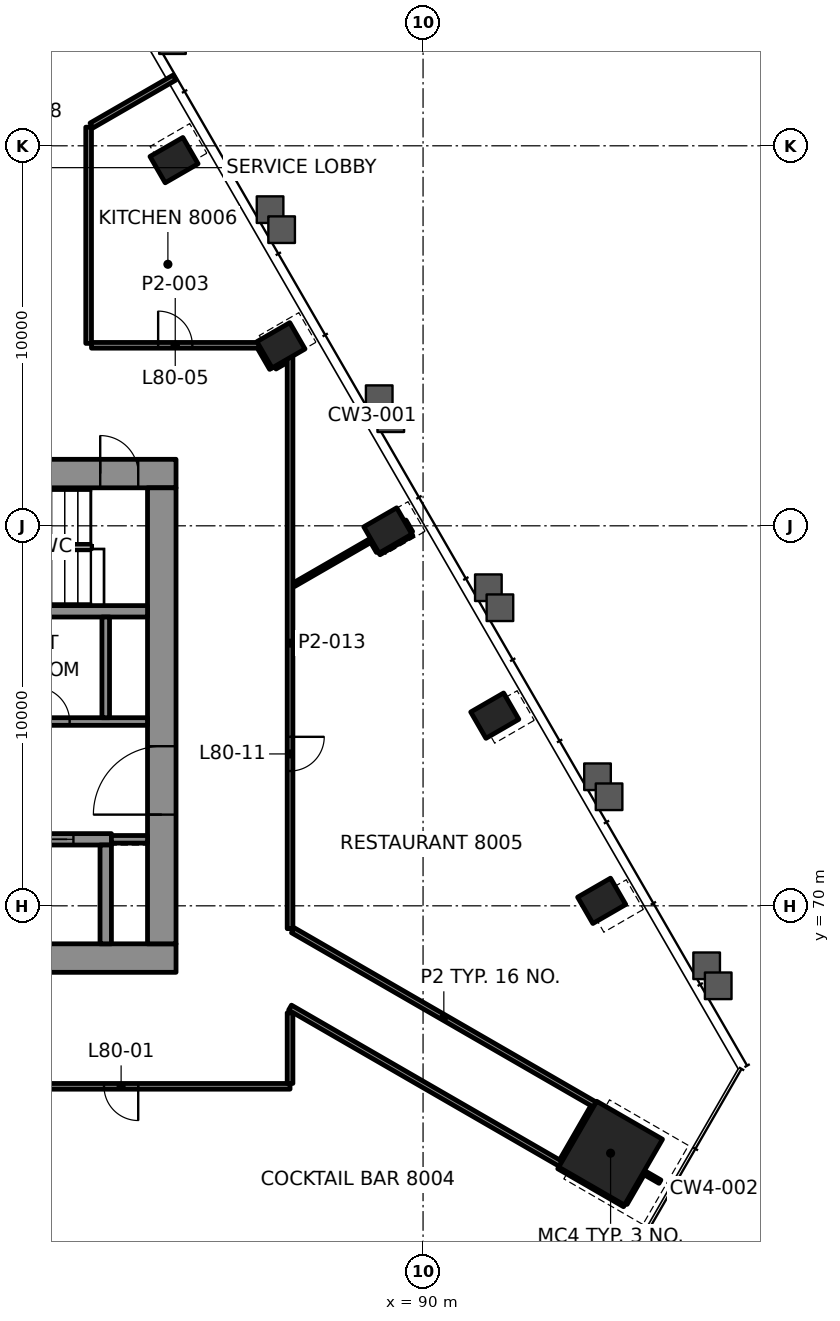
"""IFC4 building model, lengths in metres.
Left out: names, types, materials, properties, quantities, classifications, styles, units other than length and angle.
Written with IfcOpenShell. Run it as: python <this file> out.ifc"""

import sys

from ifc_helpers import new_model, si_unit, direction, frame, frame_2d, origin, origin_2d, place, context, subcontext, project, spatial, rectangle, hollow_rectangle, extrude, element, fill, save


model = new_model("IFC4")
c1 = context("Model", 3, precision=1e-05, world=origin(), true_north=direction((0.0, 1.0)))
c2 = subcontext(c1, "Body", "Model", "MODEL_VIEW")
j1 = project(units=[si_unit("LENGTHUNIT", "METRE"), si_unit("PLANEANGLEUNIT", "RADIAN")], contexts=[c1])
p1 = place(None, origin())
s1 = spatial("IfcSite", under=j1, at=p1, CompositionType="ELEMENT")
p2 = place(p1, origin())
s2 = spatial("IfcBuilding", under=s1, at=p2, CompositionType="ELEMENT")
p3 = place(p2, frame((0.0, 0.0, 326.6)))
s3 = spatial("IfcBuildingStorey", under=s2, at=p3, CompositionType="ELEMENT", Elevation=326.6)
p4 = place(p3, frame((94.935, 63.491, 0.0), z_axis=(0.0, 0.0, 1.0), x_axis=(0.5, 0.866025403784, 0.0)))
e1 = element("IfcColumn", 1, at=p4, inside=s3, PredefinedType="COLUMN", context=c2, shape_type="SweptSolid", body=[
    extrude(rectangle(XDim=2.0, YDim=2.0, at=origin_2d()), origin(), (0.0, 0.0, 1.0), 5.0),
])
for number, where, z_axis, x_axis in (
    (2, (94.701, 70.131, -0.0), (0.0, 0.0, 1.0), (-0.5, 0.866, 0.0)),
    (3, (91.887, 75.004, -0.0), (0.0, 0.0, 1.0), (-0.5, 0.866, 0.0)),
    (4, (89.074, 79.877, -0.0), (0.0, 0.0, 1.0), (-0.5, 0.866, 0.0)),
    (5, (86.26, 84.75, -0.0), (0.0, 0.0, 1.0), (-0.5, 0.866, 0.0)),
    (6, (83.447, 89.623, -0.0), (0.0, 0.0, 1.0), (-0.5, 0.866, 0.0)),
):
    element("IfcColumn", number, at=place(p3, frame(where, z_axis=z_axis, x_axis=x_axis)), inside=s3, PredefinedType="COLUMN", context=c2, shape_type="SweptSolid", body=[
        extrude(hollow_rectangle(XDim=0.8, YDim=1.0, WallThickness=0.05, at=origin_2d()), origin(), (0.0, 0.0, 1.0), 5.0),
    ])
p5 = place(p3, frame((66.5, 68.625, 0.0), z_axis=(0.0, 0.0, 1.0), x_axis=(1.0, 0.0, 0.0)))
e7 = element("IfcWall", 7, at=p5, inside=s3, PredefinedType="SHEAR", context=c2, shape_type="SweptSolid", body=[
    extrude(rectangle(XDim=17.0, YDim=0.75, at=frame_2d((8.5, 0.0))), origin(), (0.0, 0.0, 1.0), 4.7),
])
p6 = place(p5, frame((2.7, 0.0, 0.0)))
e8 = element("IfcOpeningElement", 8, at=p6, cuts=e7, PredefinedType="OPENING", context=c2, shape_type="SweptSolid", body=[
    extrude(rectangle(XDim=0.9, YDim=2.1, at=frame_2d((0.45, 1.05))), frame((0.0, 0.385, 0.0), z_axis=(0.0, -1.0, 0.0), x_axis=(1.0, 0.0, 0.0)), (0.0, 0.0, 1.0), 0.77),
])
p7 = place(p3, frame((66.5, 81.375, 0.0), z_axis=(0.0, 0.0, 1.0), x_axis=(1.0, 0.0, 0.0)))
e9 = element("IfcWall", 9, at=p7, inside=s3, PredefinedType="SHEAR", context=c2, shape_type="SweptSolid", body=[
    extrude(rectangle(XDim=17.0, YDim=0.75, at=frame_2d((8.5, 0.0))), origin(), (0.0, 0.0, 1.0), 4.7),
])
p8 = place(p7, frame((1.195, 0.0, 0.0)))
e10 = element("IfcOpeningElement", 10, at=p8, cuts=e9, PredefinedType="OPENING", context=c2, shape_type="SweptSolid", body=[
    extrude(rectangle(XDim=1.0, YDim=2.1, at=frame_2d((0.5, 1.05))), frame((0.0, 0.385, 0.0), z_axis=(0.0, -1.0, 0.0), x_axis=(1.0, 0.0, 0.0)), (0.0, 0.0, 1.0), 0.77),
])
p9 = place(p7, frame((15.005, 0.0, 0.0)))
e11 = element("IfcOpeningElement", 11, at=p9, cuts=e9, PredefinedType="OPENING", context=c2, shape_type="SweptSolid", body=[
    extrude(rectangle(XDim=1.0, YDim=2.1, at=frame_2d((0.5, 1.05))), frame((0.0, 0.385, 0.0), z_axis=(0.0, -1.0, 0.0), x_axis=(1.0, 0.0, 0.0)), (0.0, 0.0, 1.0), 0.77),
])
p10 = place(p7, frame((8.15, 0.0, 0.0)))
e12 = element("IfcOpeningElement", 12, at=p10, cuts=e9, PredefinedType="OPENING", context=c2, shape_type="SweptSolid", body=[
    extrude(rectangle(XDim=0.9, YDim=2.1, at=frame_2d((0.45, 1.05))), frame((0.0, 0.385, 0.0), z_axis=(0.0, -1.0, 0.0), x_axis=(1.0, 0.0, 0.0)), (0.0, 0.0, 1.0), 0.77),
])
p11 = place(p3, frame((83.125, 69.0, 0.0), z_axis=(0.0, 0.0, 1.0), x_axis=(0.0, 1.0, 0.0)))
e13 = element("IfcWall", 13, at=p11, inside=s3, PredefinedType="SHEAR", context=c2, shape_type="SweptSolid", body=[
    extrude(rectangle(XDim=12.0, YDim=0.75, at=frame_2d((6.0, 0.0))), origin(), (0.0, 0.0, 1.0), 4.7),
])
p12 = place(p11, frame((3.4, 0.0, 0.0)))
e14 = element("IfcOpeningElement", 14, at=p12, cuts=e13, PredefinedType="OPENING", context=c2, shape_type="SweptSolid", body=[
    extrude(rectangle(XDim=1.8, YDim=2.1, at=frame_2d((0.9, 1.05))), frame((0.0, 0.385, 0.0), z_axis=(0.0, -1.0, 0.0), x_axis=(1.0, 0.0, 0.0)), (0.0, 0.0, 1.0), 0.77),
])
p13 = place(p3, frame((70.3, 71.75, 0.0), z_axis=(0.0, 0.0, 1.0), x_axis=(1.0, 0.0, 0.0)))
e15 = element("IfcWall", 15, at=p13, inside=s3, PredefinedType="SHEAR", context=c2, shape_type="SweptSolid", body=[
    extrude(rectangle(XDim=11.5, YDim=0.3, at=frame_2d((5.75, 0.0))), origin(), (0.0, 0.0, 1.0), 4.7),
])
p14 = place(p13, frame((1.0, 0.0, 0.0)))
e16 = element("IfcOpeningElement", 16, at=p14, cuts=e15, PredefinedType="OPENING", context=c2, shape_type="SweptSolid", body=[
    extrude(rectangle(XDim=1.1, YDim=2.1, at=frame_2d((0.55, 1.05))), frame((0.0, 0.16, 0.0), z_axis=(0.0, -1.0, 0.0), x_axis=(1.0, 0.0, 0.0)), (0.0, 0.0, 1.0), 0.32),
])
p15 = place(p13, frame((3.8, 0.0, 0.0)))
e17 = element("IfcOpeningElement", 17, at=p15, cuts=e15, PredefinedType="OPENING", context=c2, shape_type="SweptSolid", body=[
    extrude(rectangle(XDim=1.1, YDim=2.1, at=frame_2d((0.55, 1.05))), frame((0.0, 0.16, 0.0), z_axis=(0.0, -1.0, 0.0), x_axis=(1.0, 0.0, 0.0)), (0.0, 0.0, 1.0), 0.32),
])
p16 = place(p13, frame((6.6, 0.0, 0.0)))
e18 = element("IfcOpeningElement", 18, at=p16, cuts=e15, PredefinedType="OPENING", context=c2, shape_type="SweptSolid", body=[
    extrude(rectangle(XDim=1.1, YDim=2.1, at=frame_2d((0.55, 1.05))), frame((0.0, 0.16, 0.0), z_axis=(0.0, -1.0, 0.0), x_axis=(1.0, 0.0, 0.0)), (0.0, 0.0, 1.0), 0.32),
])
p17 = place(p13, frame((9.4, 0.0, 0.0)))
e19 = element("IfcOpeningElement", 19, at=p17, cuts=e15, PredefinedType="OPENING", context=c2, shape_type="SweptSolid", body=[
    extrude(rectangle(XDim=1.1, YDim=2.1, at=frame_2d((0.55, 1.05))), frame((0.0, 0.16, 0.0), z_axis=(0.0, -1.0, 0.0), x_axis=(1.0, 0.0, 0.0)), (0.0, 0.0, 1.0), 0.32),
])
p18 = place(p3, frame((81.65, 69.0, 0.0), z_axis=(0.0, 0.0, 1.0), x_axis=(0.0, 1.0, 0.0)))
e20 = element("IfcWall", 20, at=p18, inside=s3, PredefinedType="SHEAR", context=c2, shape_type="SweptSolid", body=[
    extrude(rectangle(XDim=2.6, YDim=0.3, at=frame_2d((1.3, 0.0))), origin(), (0.0, 0.0, 1.0), 4.7),
])
p19 = place(p3, frame((67.25, 77.75, 0.0), z_axis=(0.0, 0.0, 1.0), x_axis=(1.0, 0.0, 0.0)))
e21 = element("IfcWall", 21, at=p19, inside=s3, PredefinedType="SHEAR", context=c2, shape_type="SweptSolid", body=[
    extrude(rectangle(XDim=15.5, YDim=0.3, at=frame_2d((7.75, 0.0))), origin(), (0.0, 0.0, 1.0), 4.7),
])
p20 = place(p19, frame((0.445, 0.0, 0.0)))
e22 = element("IfcOpeningElement", 22, at=p20, cuts=e21, PredefinedType="OPENING", context=c2, shape_type="SweptSolid", body=[
    extrude(rectangle(XDim=1.0, YDim=2.1, at=frame_2d((0.5, 1.05))), frame((0.0, 0.16, 0.0), z_axis=(0.0, -1.0, 0.0), x_axis=(1.0, 0.0, 0.0)), (0.0, 0.0, 1.0), 0.32),
])
p21 = place(p3, frame((86.5, 65.25, 0.0), z_axis=(0.0, 0.0, 1.0), x_axis=(-1.0, 0.0, 0.0)))
e23 = element("IfcWall", 23, at=p21, inside=s3, PredefinedType="PARTITIONING", context=c2, shape_type="SweptSolid", body=[
    extrude(rectangle(XDim=22.999, YDim=0.15, at=frame_2d((11.5, 0.0))), origin(), (0.0, 0.0, 1.0), 4.1),
])
p22 = place(p21, frame((3.995, 0.0, 0.0)))
e24 = element("IfcOpeningElement", 24, at=p22, cuts=e23, PredefinedType="OPENING", context=c2, shape_type="SweptSolid", body=[
    extrude(rectangle(XDim=0.9, YDim=2.1, at=frame_2d((0.45, 1.05))), frame((0.0, 0.085, 0.0), z_axis=(0.0, -1.0, 0.0), x_axis=(1.0, 0.0, 0.0)), (0.0, 0.0, 1.0), 0.17),
])
p23 = place(p21, frame((14.198, 0.0, 0.0)))
e25 = element("IfcOpeningElement", 25, at=p23, cuts=e23, PredefinedType="OPENING", context=c2, shape_type="SweptSolid", body=[
    extrude(rectangle(XDim=1.0, YDim=2.1, at=frame_2d((0.5, 1.05))), frame((0.0, 0.085, 0.0), z_axis=(0.0, -1.0, 0.0), x_axis=(1.0, 0.0, 0.0)), (0.0, 0.0, 1.0), 0.17),
])
p24 = place(p21, frame((21.253, 0.0, 0.0)))
e26 = element("IfcOpeningElement", 26, at=p24, cuts=e23, PredefinedType="OPENING", context=c2, shape_type="SweptSolid", body=[
    extrude(rectangle(XDim=1.0, YDim=2.1, at=frame_2d((0.5, 1.05))), frame((0.0, 0.085, 0.0), z_axis=(0.0, -1.0, 0.0), x_axis=(1.0, 0.0, 0.0)), (0.0, 0.0, 1.0), 0.17),
])
p25 = place(p3, frame((81.276, 84.75, 0.0), z_axis=(0.0, 0.0, 1.0), x_axis=(1.0, 0.0, 0.0)))
e27 = element("IfcWall", 27, at=p25, inside=s3, PredefinedType="PARTITIONING", context=c2, shape_type="SweptSolid", body=[
    extrude(rectangle(XDim=4.407, YDim=0.15, at=frame_2d((2.204, 0.0))), origin(), (0.0, 0.0, 1.0), 4.1),
])
p26 = place(p25, frame((1.754, 0.0, 0.0)))
e28 = element("IfcOpeningElement", 28, at=p26, cuts=e27, PredefinedType="OPENING", context=c2, shape_type="SweptSolid", body=[
    extrude(rectangle(XDim=0.9, YDim=2.1, at=frame_2d((0.45, 1.05))), frame((0.0, 0.085, 0.0), z_axis=(0.0, -1.0, 0.0), x_axis=(1.0, 0.0, 0.0)), (0.0, 0.0, 1.0), 0.17),
])
p27 = place(p3, frame((88.841, 79.281, 0.0), z_axis=(0.0, 0.0, 1.0), x_axis=(0.866039090965, 0.499976292358, 0.0)))
e29 = element("IfcWall", 29, at=p27, inside=s3, PredefinedType="PARTITIONING", context=c2, shape_type="SweptSolid", body=[
    extrude(rectangle(XDim=0.999, YDim=0.1, at=frame_2d((0.5, 0.0))), origin(), (0.0, 0.0, 1.0), 4.088),
])
p28 = place(p3, frame((86.601, 78.45, 0.0), z_axis=(0.0, 0.0, 1.0), x_axis=(0.866007751199, 0.500030573929, 0.0)))
e30 = element("IfcWall", 30, at=p28, inside=s3, PredefinedType="PARTITIONING", context=c2, shape_type="SweptSolid", body=[
    extrude(rectangle(XDim=2.355, YDim=0.1, at=frame_2d((1.177, 0.0))), origin(), (0.0, 0.0, 1.0), 4.1),
])
p29 = place(p3, frame((86.093, 84.191, 0.0), z_axis=(0.0, 0.0, 1.0), x_axis=(0.866112258846, 0.499849532436, 0.0)))
e31 = element("IfcWall", 31, at=p29, inside=s3, PredefinedType="PARTITIONING", context=c2, shape_type="SweptSolid", body=[
    extrude(rectangle(XDim=0.333, YDim=0.15, at=frame_2d((0.166, 0.0))), origin(), (0.0, 0.0, 1.0), 4.088),
])
p30 = place(p3, frame((81.275, 90.534, 0.0), z_axis=(0.0, 0.0, 1.0), x_axis=(0.866045539517, 0.499965122266, 0.0)))
e32 = element("IfcWall", 32, at=p30, inside=s3, PredefinedType="PARTITIONING", context=c2, shape_type="SweptSolid", body=[
    extrude(rectangle(XDim=2.526, YDim=0.15, at=frame_2d((1.263, 0.0))), origin(), (0.0, 0.0, 1.0), 4.1),
])
p31 = place(p3, frame((95.325, 62.169, 0.0), z_axis=(0.0, 0.0, 1.0), x_axis=(0.50012328804, 0.865954211699, 0.0)))
e33 = element("IfcWall", 33, at=p31, inside=s3, PredefinedType="PARTITIONING", context=c2, shape_type="SweptSolid", body=[
    extrude(rectangle(XDim=0.949, YDim=0.1, at=frame_2d((0.475, 0.0))), origin(), (0.0, 0.0, 1.0), 4.1),
])
p32 = place(p3, frame((93.658, 63.281, 0.0), z_axis=(0.0, 0.0, 1.0), x_axis=(0.499988108725, 0.866032269107, 0.0)))
e34 = element("IfcWall", 34, at=p32, inside=s3, PredefinedType="PARTITIONING", context=c2, shape_type="SweptSolid", body=[
    extrude(rectangle(XDim=1.644, YDim=0.15, at=frame_2d((0.822, 0.0))), origin(), (0.0, 0.0, 1.0), 4.097),
])
p33 = place(p3, frame((86.5, 65.325, 0.0), z_axis=(0.0, 0.0, 1.0), x_axis=(0.0, 1.0, 0.0)))
e35 = element("IfcWall", 35, at=p33, inside=s3, PredefinedType="PARTITIONING", context=c2, shape_type="SweptSolid", body=[
    extrude(rectangle(XDim=1.859, YDim=0.15, at=frame_2d((0.93, 0.0))), origin(), (0.0, 0.0, 1.0), 4.097),
])
p34 = place(p3, frame((86.5, 84.425, 0.0), z_axis=(0.0, 0.0, 1.0), x_axis=(0.0, -1.0, 0.0)))
e36 = element("IfcWall", 36, at=p34, inside=s3, PredefinedType="PARTITIONING", context=c2, shape_type="SweptSolid", body=[
    extrude(rectangle(XDim=15.026, YDim=0.15, at=frame_2d((7.513, 0.0))), origin(), (0.0, 0.0, 1.0), 4.088),
])
p35 = place(p34, frame((9.978, 0.0, 0.0)))
e37 = element("IfcOpeningElement", 37, at=p35, cuts=e36, PredefinedType="OPENING", context=c2, shape_type="SweptSolid", body=[
    extrude(rectangle(XDim=0.9, YDim=2.1, at=frame_2d((0.45, 1.05))), frame((0.0, 0.085, 0.0), z_axis=(0.0, -1.0, 0.0), x_axis=(1.0, 0.0, 0.0)), (0.0, 0.0, 1.0), 0.17),
])
p36 = place(p3, frame((81.2, 84.801, 0.0), z_axis=(0.0, 0.0, 1.0), x_axis=(0.0, 1.0, 0.0)))
e38 = element("IfcWall", 38, at=p36, inside=s3, PredefinedType="PARTITIONING", context=c2, shape_type="SweptSolid", body=[
    extrude(rectangle(XDim=5.69, YDim=0.15, at=frame_2d((2.845, 0.0))), origin(), (0.0, 0.0, 1.0), 4.1),
])
p37 = place(p3, frame((89.682, 79.824, 0.0), z_axis=(0.0, 0.0, 1.0), x_axis=(-0.500126092966, 0.865952591736, 0.0)))
e39 = element("IfcWall", 39, at=p37, inside=s3, PredefinedType="PARTITIONING", context=c2, shape_type="SweptSolid", body=[
    extrude(rectangle(XDim=0.349, YDim=0.1, at=frame_2d((0.175, 0.0))), origin(), (0.0, 0.0, 1.0), 4.1),
])
p38 = place(p3, frame((88.816, 79.324, 0.0), z_axis=(0.0, 0.0, 1.0), x_axis=(-0.500617711777, 0.865668473872, 0.0)))
e40 = element("IfcWall", 40, at=p38, inside=s3, PredefinedType="PARTITIONING", context=c2, shape_type="SweptSolid", body=[
    extrude(rectangle(XDim=0.299, YDim=0.1, at=frame_2d((0.149, 0.0))), origin(), (0.0, 0.0, 1.0), 4.1),
])
p39 = place(p3, frame((86.028, 84.154, 0.0), z_axis=(0.0, 0.0, 1.0), x_axis=(-0.500155846824, 0.86593540688, 0.0)))
e41 = element("IfcWall", 41, at=p39, inside=s3, PredefinedType="PARTITIONING", context=c2, shape_type="SweptSolid", body=[
    extrude(rectangle(XDim=0.601, YDim=0.15, at=frame_2d((0.301, 0.0))), origin(), (0.0, 0.0, 1.0), 4.1),
])
p40 = place(p3, frame((94.518, 64.771, 0.0), z_axis=(0.0, 0.0, 1.0), x_axis=(-0.866026452747, 0.499998183138, 0.0)))
e42 = element("IfcWall", 42, at=p40, inside=s3, PredefinedType="PARTITIONING", context=c2, shape_type="SweptSolid", body=[
    extrude(rectangle(XDim=9.172, YDim=0.15, at=frame_2d((4.586, 0.0))), origin(), (0.0, 0.0, 1.0), 4.1),
])
p41 = place(p3, frame((96.234, 62.741, 0.0), z_axis=(0.0, 0.0, 1.0), x_axis=(-0.866230789891, 0.499644091975, 0.0)))
e43 = element("IfcWall", 43, at=p41, inside=s3, PredefinedType="PARTITIONING", context=c2, shape_type="SweptSolid", body=[
    extrude(rectangle(XDim=0.449, YDim=0.1, at=frame_2d((0.225, 0.0))), origin(), (0.0, 0.0, 1.0), 4.1),
])
p42 = place(p3, frame((93.618, 63.211, 0.0), z_axis=(0.0, 0.0, 1.0), x_axis=(-0.866022854634, 0.500004415232, 0.0)))
e44 = element("IfcWall", 44, at=p42, inside=s3, PredefinedType="PARTITIONING", context=c2, shape_type="SweptSolid", body=[
    extrude(rectangle(XDim=8.22, YDim=0.15, at=frame_2d((4.11, 0.0))), origin(), (0.0, 0.0, 1.0), 4.097),
])
p43 = place(p3, frame((95.3, 62.125, 0.0), z_axis=(0.0, 0.0, 1.0), x_axis=(-0.866077797426, 0.499909240568, 0.0)))
e45 = element("IfcWall", 45, at=p43, inside=s3, PredefinedType="PARTITIONING", context=c2, shape_type="SweptSolid", body=[
    extrude(rectangle(XDim=1.999, YDim=0.1, at=frame_2d((1.0, 0.0))), origin(), (0.0, 0.0, 1.0), 4.1),
])
p44 = place(p3, frame((81.8, 71.75, 0.0), z_axis=(0.0, 0.0, 1.0), x_axis=(1.0, 0.0, 0.0)))
e46 = element("IfcWall", 46, at=p44, inside=s3, PredefinedType="PARTITIONING", context=c2, shape_type="SweptSolid", body=[
    extrude(rectangle(XDim=0.95, YDim=0.2, at=frame_2d((0.475, 0.0))), origin(), (0.0, 0.0, 1.0), 4.7),
])
p45 = place(p3, frame((76.2, 74.85, 0.0), z_axis=(0.0, 0.0, 1.0), x_axis=(1.0, 0.0, 0.0)))
e47 = element("IfcWall", 47, at=p45, inside=s3, PredefinedType="PARTITIONING", context=c2, shape_type="SweptSolid", body=[
    extrude(rectangle(XDim=6.55, YDim=0.2, at=frame_2d((3.275, 0.0))), origin(), (0.0, 0.0, 1.0), 4.7),
])
p46 = place(p45, frame((0.8, 0.0, 0.0)))
e48 = element("IfcOpeningElement", 48, at=p46, cuts=e47, PredefinedType="OPENING", context=c2, shape_type="SweptSolid", body=[
    extrude(rectangle(XDim=0.9, YDim=2.1, at=frame_2d((0.45, 1.05))), frame((0.0, 0.11, 0.0), z_axis=(0.0, -1.0, 0.0), x_axis=(1.0, 0.0, 0.0)), (0.0, 0.0, 1.0), 0.22),
])
p47 = place(p45, frame((3.6, 0.0, 0.0)))
e49 = element("IfcOpeningElement", 49, at=p47, cuts=e47, PredefinedType="OPENING", context=c2, shape_type="SweptSolid", body=[
    extrude(rectangle(XDim=0.9, YDim=2.1, at=frame_2d((0.45, 1.05))), frame((0.0, 0.11, 0.0), z_axis=(0.0, -1.0, 0.0), x_axis=(1.0, 0.0, 0.0)), (0.0, 0.0, 1.0), 0.22),
])
p48 = place(p3, frame((81.65, 74.95, 0.0), z_axis=(0.0, 0.0, 1.0), x_axis=(0.0, 1.0, 0.0)))
e50 = element("IfcWall", 50, at=p48, inside=s3, PredefinedType="PARTITIONING", context=c2, shape_type="SweptSolid", body=[
    extrude(rectangle(XDim=2.65, YDim=0.2, at=frame_2d((1.325, 0.0))), origin(), (0.0, 0.0, 1.0), 4.7),
])
p49 = place(p22, origin())
e51 = element("IfcDoor", 51, at=p49, inside=s3, OperationType="SINGLE_SWING_RIGHT", PredefinedType="DOOR", context=c2, shape_type="SweptSolid", body=[
    extrude(rectangle(XDim=0.9, YDim=2.1, at=frame_2d((0.45, 1.05))), frame((0.0, 0.025, 0.0), z_axis=(0.0, -1.0, 0.0), x_axis=(1.0, 0.0, 0.0)), (0.0, 0.0, 1.0), 0.05),
])
fill(e24, e51)
p50 = place(p26, origin())
e52 = element("IfcDoor", 52, at=p50, inside=s3, OperationType="SINGLE_SWING_LEFT", PredefinedType="DOOR", context=c2, shape_type="SweptSolid", body=[
    extrude(rectangle(XDim=0.9, YDim=2.1, at=frame_2d((0.45, 1.05))), frame((0.0, 0.025, 0.0), z_axis=(0.0, -1.0, 0.0), x_axis=(1.0, 0.0, 0.0)), (0.0, 0.0, 1.0), 0.05),
])
fill(e28, e52)
p51 = place(p35, origin())
e53 = element("IfcDoor", 53, at=p51, inside=s3, OperationType="SINGLE_SWING_LEFT", PredefinedType="DOOR", context=c2, shape_type="SweptSolid", body=[
    extrude(rectangle(XDim=0.9, YDim=2.1, at=frame_2d((0.45, 1.05))), frame((0.0, 0.025, 0.0), z_axis=(0.0, -1.0, 0.0), x_axis=(1.0, 0.0, 0.0)), (0.0, 0.0, 1.0), 0.05),
])
fill(e37, e53)
p52 = place(p17, origin())
e54 = element("IfcDoor", 54, at=p52, inside=s3, OperationType="DOUBLE_DOOR_SLIDING", PredefinedType="DOOR", context=c2, shape_type="SweptSolid", body=[
    extrude(rectangle(XDim=1.1, YDim=2.1, at=frame_2d((0.55, 1.05))), frame((0.0, 0.025, 0.0), z_axis=(0.0, -1.0, 0.0), x_axis=(1.0, 0.0, 0.0)), (0.0, 0.0, 1.0), 0.05),
])
fill(e19, e54)
p53 = place(p9, origin())
e55 = element("IfcDoor", 55, at=p53, inside=s3, OperationType="SINGLE_SWING_LEFT", PredefinedType="DOOR", context=c2, shape_type="SweptSolid", body=[
    extrude(rectangle(XDim=1.0, YDim=2.1, at=frame_2d((0.5, 1.05))), frame((0.0, 0.095, 0.0), z_axis=(0.0, -1.0, 0.0), x_axis=(1.0, 0.0, 0.0)), (0.0, 0.0, 1.0), 0.19),
])
fill(e11, e55)
p54 = place(p12, origin())
e56 = element("IfcDoor", 56, at=p54, inside=s3, OperationType="SINGLE_SWING_LEFT", PredefinedType="DOOR", context=c2, shape_type="SweptSolid", body=[
    extrude(rectangle(XDim=1.8, YDim=2.1, at=frame_2d((0.9, 1.05))), frame((0.0, 0.095, 0.0), z_axis=(0.0, -1.0, 0.0), x_axis=(1.0, 0.0, 0.0)), (0.0, 0.0, 1.0), 0.19),
])
fill(e14, e56)
p55 = place(p47, origin())
e57 = element("IfcDoor", 57, at=p55, inside=s3, OperationType="SINGLE_SWING_LEFT", PredefinedType="DOOR", context=c2, shape_type="SweptSolid", body=[
    extrude(rectangle(XDim=0.9, YDim=2.1, at=frame_2d((0.45, 1.05))), frame((0.0, 0.025, 0.0), z_axis=(0.0, -1.0, 0.0), x_axis=(1.0, 0.0, 0.0)), (0.0, 0.0, 1.0), 0.05),
])
fill(e49, e57)
save(model, sys.argv[1])
